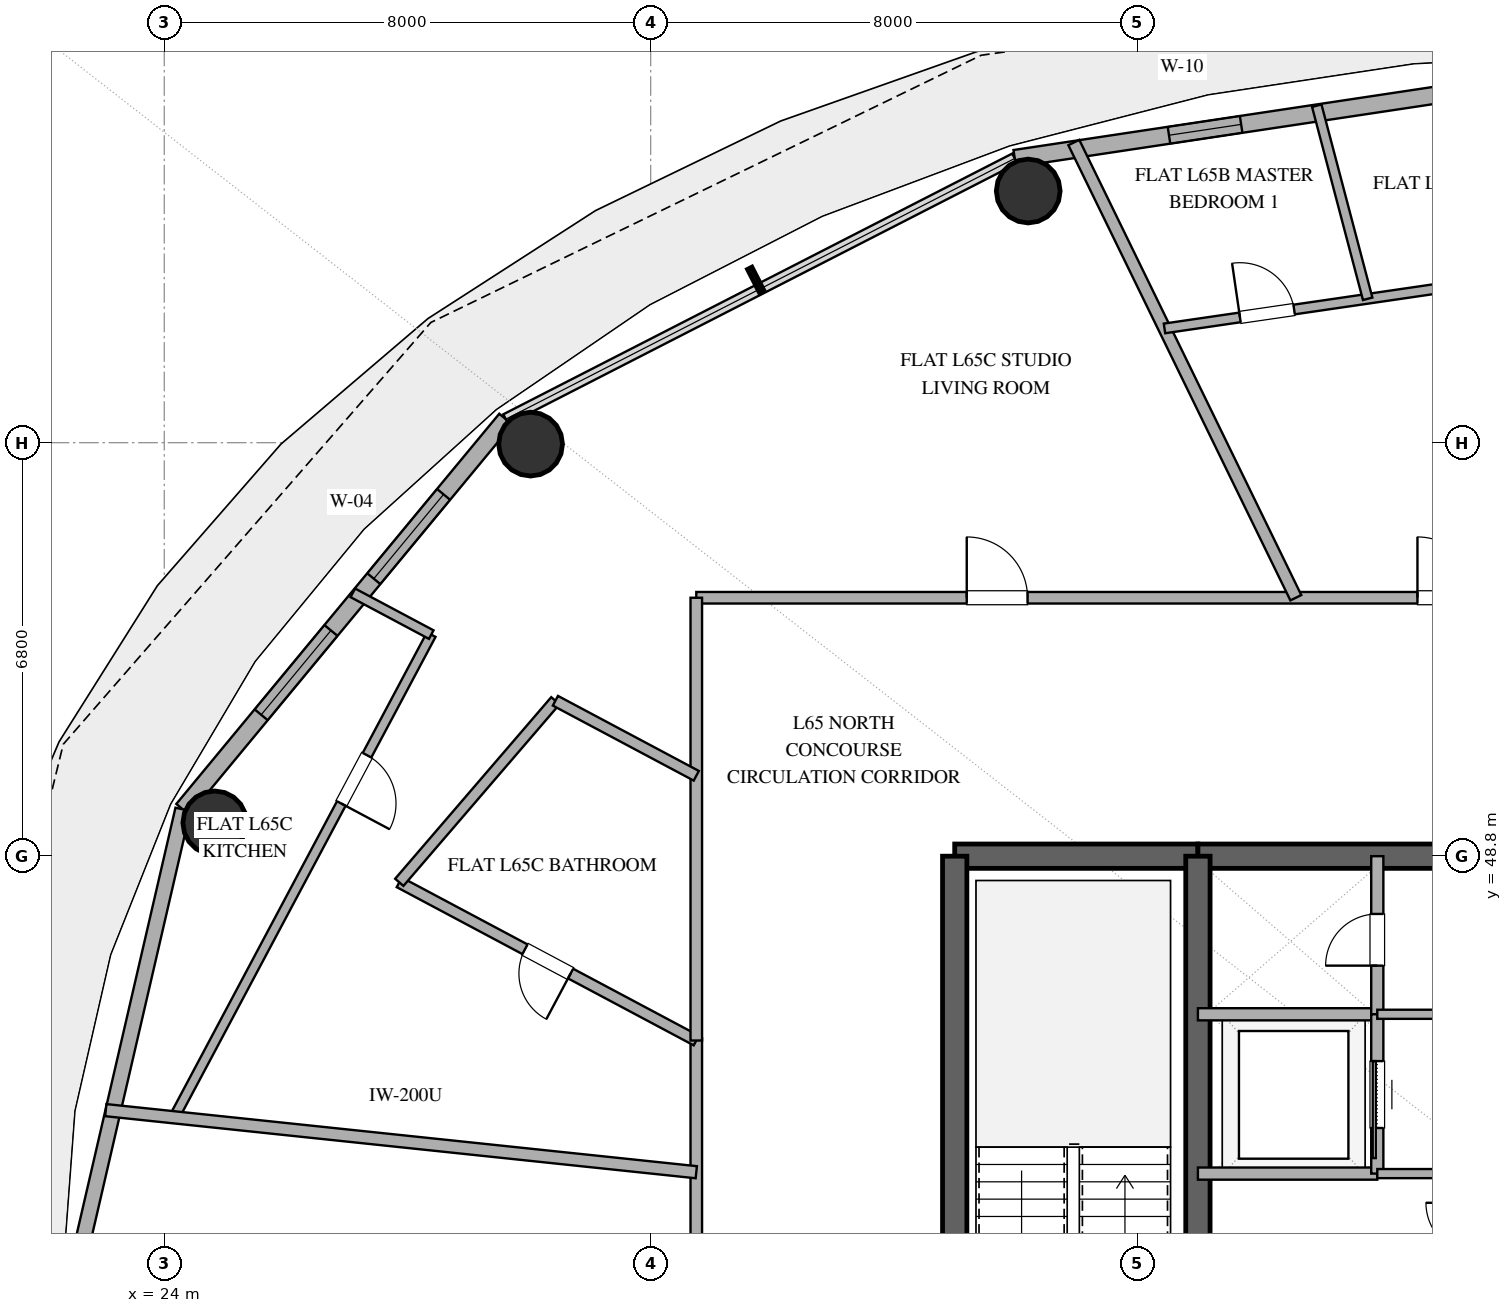
"""IFC4 building model, lengths in metres.
Left out: names, types, materials, properties, quantities, classifications, styles, units other than length and angle.
Written with IfcOpenShell. Run it as: python <this file> out.ifc"""

import sys

from ifc_helpers import new_model, si_unit, direction, frame, frame_2d, origin, origin_2d, place, context, subcontext, project, spatial, rectangle, hollow_circle, extrude, element, fill, save


model = new_model("IFC4")
c1 = context("Model", 3, precision=1e-05, world=origin(), true_north=direction((0.0, 1.0)))
c2 = subcontext(c1, "Body", "Model", "MODEL_VIEW")
j1 = project(units=[si_unit("LENGTHUNIT", "METRE"), si_unit("PLANEANGLEUNIT", "RADIAN")], contexts=[c1])
p1 = place(None, origin())
s1 = spatial("IfcSite", under=j1, at=p1, CompositionType="ELEMENT")
p2 = place(p1, origin())
s2 = spatial("IfcBuilding", under=s1, at=p2, CompositionType="ELEMENT")
p3 = place(p2, frame((0.0, 0.0, 253.2)))
s3 = spatial("IfcBuildingStorey", under=s2, at=p3, CompositionType="ELEMENT", Elevation=253.2)
p4 = place(p3, frame((37.0, 48.8, 0.0), z_axis=(0.0, 0.0, 1.0), x_axis=(1.0, 0.0, 0.0)))
e1 = element("IfcWall", 1, at=p4, inside=s3, PredefinedType="SHEAR", context=c2, shape_type="SweptSolid", body=[
    extrude(rectangle(XDim=4.0, YDim=0.4, at=frame_2d((2.0, 0.0))), origin(), (0.0, 0.0, 1.0), 3.25),
])
p5 = place(p3, frame((41.0, 48.8, 0.0), z_axis=(0.0, 0.0, 1.0), x_axis=(1.0, 0.0, 0.0)))
e2 = element("IfcWall", 2, at=p5, inside=s3, PredefinedType="SHEAR", context=c2, shape_type="SweptSolid", body=[
    extrude(rectangle(XDim=14.0, YDim=0.4, at=frame_2d((7.0, 0.0))), origin(), (0.0, 0.0, 1.0), 3.25),
])
p6 = place(p5, frame((6.1, 0.0, 0.0)))
e3 = element("IfcOpeningElement", 3, at=p6, cuts=e2, PredefinedType="OPENING", context=c2, shape_type="SweptSolid", body=[
    extrude(rectangle(XDim=1.8, YDim=2.25, at=frame_2d((0.9, 1.125))), frame((0.0, 0.21, 0.0), z_axis=(0.0, -1.0, 0.0), x_axis=(1.0, 0.0, 0.0)), (0.0, 0.0, 1.0), 0.42),
])
p7 = place(p3, frame((37.0, 35.2, 0.0), z_axis=(0.0, 0.0, 1.0), x_axis=(0.0, 1.0, 0.0)))
e4 = element("IfcWall", 4, at=p7, inside=s3, PredefinedType="SHEAR", context=c2, shape_type="SweptSolid", body=[
    extrude(rectangle(XDim=13.6, YDim=0.4, at=frame_2d((6.8, 0.0))), origin(), (0.0, 0.0, 1.0), 3.25),
])
p8 = place(p3, frame((41.0, 35.2, 0.0), z_axis=(0.0, 0.0, 1.0), x_axis=(0.0, 1.0, 0.0)))
e5 = element("IfcWall", 5, at=p8, inside=s3, PredefinedType="SHEAR", context=c2, shape_type="SweptSolid", body=[
    extrude(rectangle(XDim=13.6, YDim=0.4, at=frame_2d((6.8, 0.0))), origin(), (0.0, 0.0, 1.0), 3.25),
])
p9 = place(p8, frame((1.15, 0.0, 0.0)))
e6 = element("IfcOpeningElement", 6, at=p9, cuts=e5, PredefinedType="OPENING", context=c2, shape_type="SweptSolid", body=[
    extrude(rectangle(XDim=1.1, YDim=2.2, at=frame_2d((0.55, 1.1))), frame((0.0, 0.21, 0.0), z_axis=(0.0, -1.0, 0.0), x_axis=(1.0, 0.0, 0.0)), (0.0, 0.0, 1.0), 0.42),
])
for number, where, z_axis, x_axis in (
    (7, (38.209, 59.739, 0.0), (0.0, 0.0, 1.0), (1.0, 0.0, 0.0)),
    (8, (30.025, 55.576, 0.0), (0.0, 0.0, 1.0), (1.0, 0.0, 0.0)),
    (9, (24.831, 49.347, 0.0), (0.0, 0.0, 1.0), (1.0, 0.0, 0.0)),
):
    element("IfcColumn", number, at=place(p3, frame(where, z_axis=z_axis, x_axis=x_axis)), inside=s3, PredefinedType="COLUMN", context=c2, shape_type="SweptSolid", body=[
        extrude(hollow_circle(Radius=0.525, WallThickness=0.028, at=origin_2d()), origin(), (0.0, 0.0, 1.0), 3.25),
    ])
p10 = place(p3, frame((48.0, 61.78, 0.0), z_axis=(0.0, 0.0, 1.0), x_axis=(-0.988882522213, -0.148698881169, 0.0)))
e10 = element("IfcWall", 10, at=p10, inside=s3, PredefinedType="SOLIDWALL", context=c2, shape_type="SweptSolid", body=[
    extrude(rectangle(XDim=10.125, YDim=0.28, at=frame_2d((5.062, 0.0))), origin(), (0.0, 0.0, 1.0), 3.25),
])
p11 = place(p10, frame((1.516, 0.0, 0.0)))
e11 = element("IfcOpeningElement", 11, at=p11, cuts=e10, PredefinedType="OPENING", context=c2, shape_type="SweptSolid", body=[
    extrude(rectangle(XDim=1.1, YDim=2.25, at=frame_2d((0.55, 1.125))), frame((0.0, 0.15, 0.0), z_axis=(0.0, -1.0, 0.0), x_axis=(1.0, 0.0, 0.0)), (0.0, 0.0, 1.0), 0.3),
])
p12 = place(p10, frame((6.36, 0.0, 0.85)))
e12 = element("IfcOpeningElement", 12, at=p12, cuts=e10, PredefinedType="OPENING", context=c2, shape_type="SweptSolid", body=[
    extrude(rectangle(XDim=1.2, YDim=1.6, at=frame_2d((0.6, 0.8))), frame((0.0, 0.15, 0.0), z_axis=(0.0, -1.0, 0.0), x_axis=(1.0, 0.0, 0.0)), (0.0, 0.0, 1.0), 0.3),
])
p13 = place(p3, frame((29.617, 55.987, 0.0), z_axis=(0.0, 0.0, 1.0), x_axis=(-0.63761509934, -0.770355103243, 0.0)))
e13 = element("IfcWall", 13, at=p13, inside=s3, PredefinedType="SOLIDWALL", context=c2, shape_type="SweptSolid", body=[
    extrude(rectangle(XDim=8.33, YDim=0.28, at=frame_2d((4.165, 0.0))), origin(), (0.0, 0.0, 1.0), 3.25),
])
p14 = place(p13, frame((1.605, 0.0, 0.85)))
e14 = element("IfcOpeningElement", 14, at=p14, cuts=e13, PredefinedType="OPENING", context=c2, shape_type="SweptSolid", body=[
    extrude(rectangle(XDim=1.8, YDim=2.2, at=frame_2d((0.9, 1.1))), frame((0.0, 0.15, 0.0), z_axis=(0.0, -1.0, 0.0), x_axis=(1.0, 0.0, 0.0)), (0.0, 0.0, 1.0), 0.3),
])
p15 = place(p13, frame((4.51, 0.0, 0.85)))
e15 = element("IfcOpeningElement", 15, at=p15, cuts=e13, PredefinedType="OPENING", context=c2, shape_type="SweptSolid", body=[
    extrude(rectangle(XDim=1.8, YDim=2.2, at=frame_2d((0.9, 1.1))), frame((0.0, 0.15, 0.0), z_axis=(0.0, -1.0, 0.0), x_axis=(1.0, 0.0, 0.0)), (0.0, 0.0, 1.0), 0.3),
])
p16 = place(p3, frame((24.306, 49.57, 0.0), z_axis=(0.0, 0.0, 1.0), x_axis=(-0.225635078214, -0.974211892495, 0.0)))
e16 = element("IfcWall", 16, at=p16, inside=s3, PredefinedType="SOLIDWALL", context=c2, shape_type="SweptSolid", body=[
    extrude(rectangle(XDim=7.77, YDim=0.25, at=frame_2d((3.885, 0.0))), origin(), (0.0, 0.0, 1.0), 3.25),
])
p17 = place(p3, frame((41.0, 46.2, 0.0), z_axis=(0.0, 0.0, 1.0), x_axis=(1.0, 0.0, 0.0)))
e17 = element("IfcWall", 17, at=p17, inside=s3, PredefinedType="SOLIDWALL", context=c2, shape_type="SweptSolid", body=[
    extrude(rectangle(XDim=2.95, YDim=0.2, at=frame_2d((1.475, 0.0))), origin(), (0.0, 0.0, 1.0), 2.61),
])
p18 = place(p3, frame((43.95, 46.2, 0.0), z_axis=(0.0, 0.0, 1.0), x_axis=(0.0, 1.0, 0.0)))
e18 = element("IfcWall", 18, at=p18, inside=s3, PredefinedType="SOLIDWALL", context=c2, shape_type="SweptSolid", body=[
    extrude(rectangle(XDim=2.6, YDim=0.2, at=frame_2d((1.3, 0.0))), origin(), (0.0, 0.0, 1.0), 2.61),
])
p19 = place(p18, frame((0.8, 0.0, 0.0)))
e19 = element("IfcOpeningElement", 19, at=p19, cuts=e18, PredefinedType="OPENING", context=c2, shape_type="SweptSolid", body=[
    extrude(rectangle(XDim=0.85, YDim=2.15, at=frame_2d((0.425, 1.075))), frame((0.0, 0.11, 0.0), z_axis=(0.0, -1.0, 0.0), x_axis=(1.0, 0.0, 0.0)), (0.0, 0.0, 1.0), 0.22),
])
p20 = place(p3, frame((41.0, 43.58, 0.0), z_axis=(0.0, 0.0, 1.0), x_axis=(1.0, 0.0, 0.0)))
e20 = element("IfcWall", 20, at=p20, inside=s3, PredefinedType="SOLIDWALL", context=c2, shape_type="SweptSolid", body=[
    extrude(rectangle(XDim=2.95, YDim=0.2, at=frame_2d((1.475, 0.0))), origin(), (0.0, 0.0, 1.0), 2.61),
])
p21 = place(p3, frame((43.95, 43.58, 0.0), z_axis=(0.0, 0.0, 1.0), x_axis=(0.0, 1.0, 0.0)))
e21 = element("IfcWall", 21, at=p21, inside=s3, PredefinedType="SOLIDWALL", context=c2, shape_type="SweptSolid", body=[
    extrude(rectangle(XDim=2.62, YDim=0.2, at=frame_2d((1.31, 0.0))), origin(), (0.0, 0.0, 1.0), 2.61),
])
p22 = place(p21, frame((0.75, 0.0, 0.0)))
e22 = element("IfcOpeningElement", 22, at=p22, cuts=e21, PredefinedType="OPENING", context=c2, shape_type="SweptSolid", body=[
    extrude(rectangle(XDim=1.1, YDim=2.2, at=frame_2d((0.55, 1.1))), frame((0.0, 0.11, 0.0), z_axis=(0.0, -1.0, 0.0), x_axis=(1.0, 0.0, 0.0)), (0.0, 0.0, 1.0), 0.22),
])
p23 = place(p3, frame((43.95, 43.58, 0.0), z_axis=(0.0, 0.0, 1.0), x_axis=(1.0, 0.0, 0.0)))
e23 = element("IfcWall", 23, at=p23, inside=s3, PredefinedType="PARTITIONING", context=c2, shape_type="SweptSolid", body=[
    extrude(rectangle(XDim=1.65, YDim=0.15, at=frame_2d((0.825, 0.0))), origin(), (0.0, 0.0, 1.0), 2.61),
])
p24 = place(p3, frame((43.95, 46.2, 0.0), z_axis=(0.0, 0.0, 1.0), x_axis=(1.0, 0.0, 0.0)))
e24 = element("IfcWall", 24, at=p24, inside=s3, PredefinedType="PARTITIONING", context=c2, shape_type="SweptSolid", body=[
    extrude(rectangle(XDim=2.45, YDim=0.15, at=frame_2d((1.225, 0.0))), origin(), (0.0, 0.0, 1.0), 2.61),
])
p25 = place(p3, frame((32.75, 30.95, 0.0), z_axis=(0.0, 0.0, 1.0), x_axis=(0.0, 1.0, 0.0)))
e25 = element("IfcWall", 25, at=p25, inside=s3, PredefinedType="PARTITIONING", context=c2, shape_type="SweptSolid", body=[
    extrude(rectangle(XDim=14.855, YDim=0.19, at=frame_2d((7.427, 0.0))), origin(), (0.0, 0.0, 1.0), 2.61),
])
p26 = place(p25, frame((5.843, 0.0, 0.0)))
e26 = element("IfcOpeningElement", 26, at=p26, cuts=e25, PredefinedType="OPENING", context=c2, shape_type="SweptSolid", body=[
    extrude(rectangle(XDim=1.0, YDim=2.2, at=frame_2d((0.5, 1.1))), frame((0.0, 0.105, 0.0), z_axis=(0.0, -1.0, 0.0), x_axis=(1.0, 0.0, 0.0)), (0.0, 0.0, 1.0), 0.21),
])
p27 = place(p3, frame((32.75, 53.05, 0.0), z_axis=(0.0, 0.0, 1.0), x_axis=(1.0, 0.0, 0.0)))
e27 = element("IfcWall", 27, at=p27, inside=s3, PredefinedType="PARTITIONING", context=c2, shape_type="SweptSolid", body=[
    extrude(rectangle(XDim=14.896, YDim=0.19, at=frame_2d((7.448, 0.0))), origin(), (0.0, 0.0, 1.0), 2.61),
])
p28 = place(p27, frame((4.448, 0.0, 0.0)))
e28 = element("IfcOpeningElement", 28, at=p28, cuts=e27, PredefinedType="OPENING", context=c2, shape_type="SweptSolid", body=[
    extrude(rectangle(XDim=1.0, YDim=2.2, at=frame_2d((0.5, 1.1))), frame((0.0, 0.105, 0.0), z_axis=(0.0, -1.0, 0.0), x_axis=(1.0, 0.0, 0.0)), (0.0, 0.0, 1.0), 0.21),
])
p29 = place(p27, frame((11.861, 0.0, 0.0)))
e29 = element("IfcOpeningElement", 29, at=p29, cuts=e27, PredefinedType="OPENING", context=c2, shape_type="SweptSolid", body=[
    extrude(rectangle(XDim=1.0, YDim=2.2, at=frame_2d((0.5, 1.1))), frame((0.0, 0.105, 0.0), z_axis=(0.0, -1.0, 0.0), x_axis=(1.0, 0.0, 0.0)), (0.0, 0.0, 1.0), 0.21),
])
p30 = place(p3, frame((28.391, 52.444, 0.0), z_axis=(0.0, 0.0, 1.0), x_axis=(-0.470083782917, -0.882621797282, 0.0)))
e30 = element("IfcWall", 30, at=p30, inside=s3, PredefinedType="PLUMBINGWALL", context=c2, shape_type="SweptSolid", body=[
    extrude(rectangle(XDim=8.994, YDim=0.16, at=frame_2d((4.497, 0.0))), origin(), (0.0, 0.0, 1.0), 2.61),
])
p31 = place(p30, frame((2.247, 0.0, 0.0)))
e31 = element("IfcOpeningElement", 31, at=p31, cuts=e30, PredefinedType="OPENING", context=c2, shape_type="SweptSolid", body=[
    extrude(rectangle(XDim=0.9, YDim=2.1, at=frame_2d((0.45, 1.05))), frame((0.0, 0.09, 0.0), z_axis=(0.0, -1.0, 0.0), x_axis=(1.0, 0.0, 0.0)), (0.0, 0.0, 1.0), 0.18),
])
p32 = place(p3, frame((23.039, 44.624, 0.0), z_axis=(0.0, 0.0, 1.0), x_axis=(0.994521469813, -0.104532512074, 0.0)))
e32 = element("IfcWall", 32, at=p32, inside=s3, PredefinedType="PARTITIONING", context=c2, shape_type="SweptSolid", body=[
    extrude(rectangle(XDim=9.765, YDim=0.2, at=frame_2d((4.882, 0.0))), origin(), (0.0, 0.0, 1.0), 2.61),
])
p33 = place(p3, frame((32.75, 45.769, 0.0), z_axis=(0.0, 0.0, 1.0), x_axis=(-0.882616579005, 0.470093580541, 0.0)))
e33 = element("IfcWall", 33, at=p33, inside=s3, PredefinedType="PLUMBINGWALL", context=c2, shape_type="SweptSolid", body=[
    extrude(rectangle(XDim=5.534, YDim=0.18, at=frame_2d((2.767, 0.0))), origin(), (0.0, 0.0, 1.0), 2.61),
])
p34 = place(p33, frame((2.342, 0.0, 0.0)))
e34 = element("IfcOpeningElement", 34, at=p34, cuts=e33, PredefinedType="OPENING", context=c2, shape_type="SweptSolid", body=[
    extrude(rectangle(XDim=0.85, YDim=2.1, at=frame_2d((0.425, 1.05))), frame((0.0, 0.1, 0.0), z_axis=(0.0, -1.0, 0.0), x_axis=(1.0, 0.0, 0.0)), (0.0, 0.0, 1.0), 0.2),
])
p35 = place(p3, frame((42.611, 53.05, 0.0), z_axis=(0.0, 0.0, 1.0), x_axis=(-0.438386671508, 0.898786474222, 0.0)))
e35 = element("IfcWall", 35, at=p35, inside=s3, PredefinedType="PARTITIONING", context=c2, shape_type="SweptSolid", body=[
    extrude(rectangle(XDim=8.329, YDim=0.2, at=frame_2d((4.165, 0.0))), origin(), (0.0, 0.0, 1.0), 2.61),
])
p36 = place(p3, frame((32.75, 53.05, 0.0), z_axis=(0.0, 0.0, 1.0), x_axis=(0.0, -1.0, 0.0)))
e36 = element("IfcWall", 36, at=p36, inside=s3, PredefinedType="PARTITIONING", context=c2, shape_type="SweptSolid", body=[
    extrude(rectangle(XDim=7.281, YDim=0.19, at=frame_2d((3.641, 0.0))), origin(), (0.0, 0.0, 1.0), 2.61),
])
p37 = place(p3, frame((40.45, 57.479, 0.0), z_axis=(0.0, 0.0, 1.0), x_axis=(0.989534552703, 0.144296115701, 0.0)))
e37 = element("IfcWall", 37, at=p37, inside=s3, PredefinedType="PLUMBINGWALL", context=c2, shape_type="SweptSolid", body=[
    extrude(rectangle(XDim=7.394, YDim=0.16, at=frame_2d((3.697, 0.0))), origin(), (0.0, 0.0, 1.0), 2.61),
])
p38 = place(p37, frame((4.919, 0.0, 0.0)))
e38 = element("IfcOpeningElement", 38, at=p38, cuts=e37, PredefinedType="OPENING", context=c2, shape_type="SweptSolid", body=[
    extrude(rectangle(XDim=0.9, YDim=2.1, at=frame_2d((0.45, 1.05))), frame((0.0, 0.09, 0.0), z_axis=(0.0, -1.0, 0.0), x_axis=(1.0, 0.0, 0.0)), (0.0, 0.0, 1.0), 0.18),
])
p39 = place(p37, frame((1.254, 0.0, 0.0)))
e39 = element("IfcOpeningElement", 39, at=p39, cuts=e37, PredefinedType="OPENING", context=c2, shape_type="SweptSolid", body=[
    extrude(rectangle(XDim=0.9, YDim=2.1, at=frame_2d((0.45, 1.05))), frame((0.0, 0.09, 0.0), z_axis=(0.0, -1.0, 0.0), x_axis=(1.0, 0.0, 0.0)), (0.0, 0.0, 1.0), 0.18),
])
p40 = place(p3, frame((27.865, 48.37, 0.0), z_axis=(0.0, 0.0, 1.0), x_axis=(0.65191382082, 0.758293063548, 0.0)))
e40 = element("IfcWall", 40, at=p40, inside=s3, PredefinedType="PLUMBINGWALL", context=c2, shape_type="SweptSolid", body=[
    extrude(rectangle(XDim=3.938, YDim=0.18, at=frame_2d((1.969, 0.0))), origin(), (0.0, 0.0, 1.0), 2.61),
])
p41 = place(p3, frame((42.955, 61.142, 0.0), z_axis=(0.0, 0.0, 1.0), x_axis=(0.254917754424, -0.96696273893, 0.0)))
e41 = element("IfcWall", 41, at=p41, inside=s3, PredefinedType="PLUMBINGWALL", context=c2, shape_type="SweptSolid", body=[
    extrude(rectangle(XDim=3.284, YDim=0.16, at=frame_2d((1.642, 0.0))), origin(), (0.0, 0.0, 1.0), 2.61),
])
p42 = place(p3, frame((30.433, 51.356, 0.0), z_axis=(0.0, 0.0, 1.0), x_axis=(0.882617950214, -0.470091006041, 0.0)))
e42 = element("IfcWall", 42, at=p42, inside=s3, PredefinedType="PLUMBINGWALL", context=c2, shape_type="SweptSolid", body=[
    extrude(rectangle(XDim=2.625, YDim=0.18, at=frame_2d((1.312, 0.0))), origin(), (0.0, 0.0, 1.0), 2.61),
])
p43 = place(p3, frame((27.101, 53.131, 0.0), z_axis=(0.0, 0.0, 1.0), x_axis=(0.882602546791, -0.470119925548, 0.0)))
e43 = element("IfcWall", 43, at=p43, inside=s3, PredefinedType="PLUMBINGWALL", context=c2, shape_type="SweptSolid", body=[
    extrude(rectangle(XDim=1.461, YDim=0.16, at=frame_2d((0.731, 0.0))), origin(), (0.0, 0.0, 1.0), 2.61),
])
p44 = place(p12, origin())
e44 = element("IfcWindow", 44, at=p44, inside=s3, PartitioningType="SINGLE_PANEL", PredefinedType="WINDOW", context=c2, shape_type="SweptSolid", body=[
    extrude(rectangle(XDim=1.2, YDim=1.6, at=frame_2d((0.6, 0.8))), frame((0.0, 0.03, 0.0), z_axis=(0.0, -1.0, 0.0), x_axis=(1.0, 0.0, 0.0)), (0.0, 0.0, 1.0), 0.06),
])
fill(e12, e44)
p45 = place(p14, origin())
e45 = element("IfcWindow", 45, at=p45, inside=s3, PartitioningType="SINGLE_PANEL", PredefinedType="WINDOW", context=c2, shape_type="SweptSolid", body=[
    extrude(rectangle(XDim=1.8, YDim=2.2, at=frame_2d((0.9, 1.1))), frame((0.0, 0.03, 0.0), z_axis=(0.0, -1.0, 0.0), x_axis=(1.0, 0.0, 0.0)), (0.0, 0.0, 1.0), 0.06),
])
fill(e14, e45)
p46 = place(p15, origin())
e46 = element("IfcWindow", 46, at=p46, inside=s3, PartitioningType="SINGLE_PANEL", PredefinedType="WINDOW", context=c2, shape_type="SweptSolid", body=[
    extrude(rectangle(XDim=1.8, YDim=2.2, at=frame_2d((0.9, 1.1))), frame((0.0, 0.03, 0.0), z_axis=(0.0, -1.0, 0.0), x_axis=(1.0, 0.0, 0.0)), (0.0, 0.0, 1.0), 0.06),
])
fill(e15, e46)
p47 = place(p19, origin())
e47 = element("IfcDoor", 47, at=p47, inside=s3, OperationType="SINGLE_SWING_LEFT", PredefinedType="DOOR", context=c2, shape_type="SweptSolid", body=[
    extrude(rectangle(XDim=0.85, YDim=2.15, at=frame_2d((0.425, 1.075))), frame((0.0, 0.025, 0.0), z_axis=(0.0, -1.0, 0.0), x_axis=(1.0, 0.0, 0.0)), (0.0, 0.0, 1.0), 0.05),
])
fill(e19, e47)
p48 = place(p22, origin())
e48 = element("IfcDoor", 48, at=p48, inside=s3, OperationType="SLIDING_TO_LEFT", PredefinedType="DOOR", context=c2, shape_type="SweptSolid", body=[
    extrude(rectangle(XDim=1.1, YDim=2.2, at=frame_2d((0.55, 1.1))), frame((0.0, 0.025, 0.0), z_axis=(0.0, -1.0, 0.0), x_axis=(1.0, 0.0, 0.0)), (0.0, 0.0, 1.0), 0.05),
])
fill(e22, e48)
p49 = place(p28, origin())
e49 = element("IfcDoor", 49, at=p49, inside=s3, OperationType="SINGLE_SWING_LEFT", PredefinedType="DOOR", context=c2, shape_type="SweptSolid", body=[
    extrude(rectangle(XDim=1.0, YDim=2.2, at=frame_2d((0.5, 1.1))), frame((0.0, 0.025, 0.0), z_axis=(0.0, -1.0, 0.0), x_axis=(1.0, 0.0, 0.0)), (0.0, 0.0, 1.0), 0.05),
])
fill(e28, e49)
p50 = place(p29, origin())
e50 = element("IfcDoor", 50, at=p50, inside=s3, OperationType="SINGLE_SWING_LEFT", PredefinedType="DOOR", context=c2, shape_type="SweptSolid", body=[
    extrude(rectangle(XDim=1.0, YDim=2.2, at=frame_2d((0.5, 1.1))), frame((0.0, 0.025, 0.0), z_axis=(0.0, -1.0, 0.0), x_axis=(1.0, 0.0, 0.0)), (0.0, 0.0, 1.0), 0.05),
])
fill(e29, e50)
p51 = place(p31, origin())
e51 = element("IfcDoor", 51, at=p51, inside=s3, OperationType="SINGLE_SWING_RIGHT", PredefinedType="DOOR", context=c2, shape_type="SweptSolid", body=[
    extrude(rectangle(XDim=0.9, YDim=2.1, at=frame_2d((0.45, 1.05))), frame((0.0, 0.025, 0.0), z_axis=(0.0, -1.0, 0.0), x_axis=(1.0, 0.0, 0.0)), (0.0, 0.0, 1.0), 0.05),
])
fill(e31, e51)
p52 = place(p34, origin())
e52 = element("IfcDoor", 52, at=p52, inside=s3, OperationType="SINGLE_SWING_LEFT", PredefinedType="DOOR", context=c2, shape_type="SweptSolid", body=[
    extrude(rectangle(XDim=0.85, YDim=2.1, at=frame_2d((0.425, 1.05))), frame((0.0, 0.025, 0.0), z_axis=(0.0, -1.0, 0.0), x_axis=(1.0, 0.0, 0.0)), (0.0, 0.0, 1.0), 0.05),
])
fill(e34, e52)
p53 = place(p39, origin())
e53 = element("IfcDoor", 53, at=p53, inside=s3, OperationType="SINGLE_SWING_LEFT", PredefinedType="DOOR", context=c2, shape_type="SweptSolid", body=[
    extrude(rectangle(XDim=0.9, YDim=2.1, at=frame_2d((0.45, 1.05))), frame((0.0, 0.025, 0.0), z_axis=(0.0, -1.0, 0.0), x_axis=(1.0, 0.0, 0.0)), (0.0, 0.0, 1.0), 0.05),
])
fill(e39, e53)
save(model, sys.argv[1])
